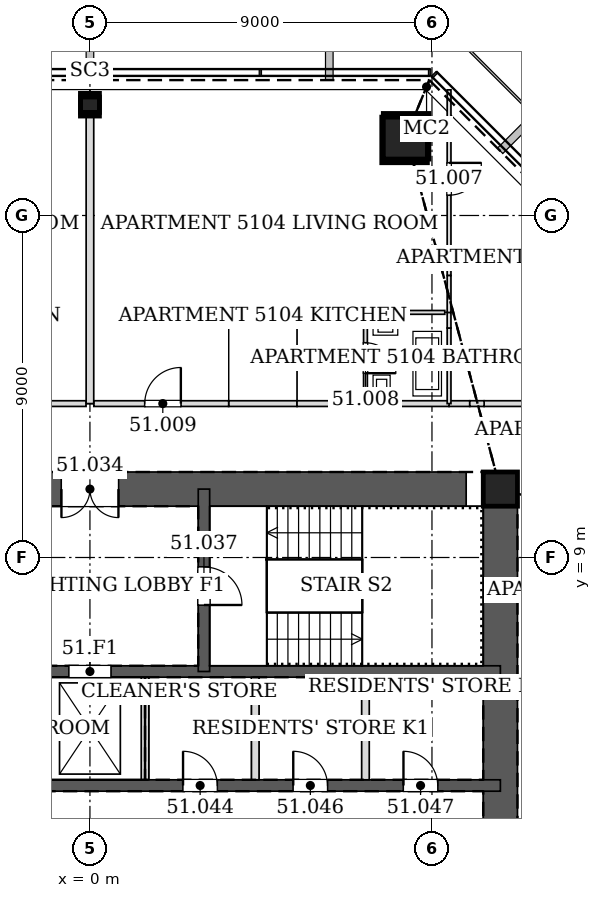
"""IFC4 building model, lengths in metres.
Left out: names, types, materials, properties, quantities, classifications, styles, units other than length and angle.
Written with IfcOpenShell. Run it as: python <this file> out.ifc"""

import sys

from ifc_helpers import new_model, si_unit, direction, frame, frame_2d, origin, origin_2d, place, context, subcontext, project, spatial, rectangle, hollow_rectangle, extrude, element, fill, save


model = new_model("IFC4")
c1 = context("Model", 3, precision=1e-05, world=origin(), true_north=direction((0.0, 1.0)))
c2 = subcontext(c1, "Body", "Model", "MODEL_VIEW")
j1 = project(units=[si_unit("LENGTHUNIT", "METRE"), si_unit("PLANEANGLEUNIT", "RADIAN")], contexts=[c1])
p1 = place(None, origin())
s1 = spatial("IfcSite", under=j1, at=p1, CompositionType="ELEMENT")
p2 = place(p1, origin())
s2 = spatial("IfcBuilding", under=s1, at=p2, CompositionType="ELEMENT")
p3 = place(p2, frame((0.0, 0.0, 221.0)))
s3 = spatial("IfcBuildingStorey", under=s2, at=p3, CompositionType="ELEMENT", Elevation=221.0)
p4 = place(p3, frame((8.319, 20.085, 0.0), z_axis=(-0.01169924247, -0.02827915051, 0.999531598986), x_axis=(0.924045401938, -0.382282742426, 0.0)))
e1 = element("IfcColumn", 1, at=p4, inside=s3, PredefinedType="COLUMN", context=c2, shape_type="SweptSolid", body=[
    extrude(hollow_rectangle(XDim=1.2, YDim=1.2, WallThickness=0.055, at=origin_2d()), origin(), (0.0, 0.0, 1.0), 3.402),
])
p5 = place(p3, frame((0.0, 20.963, 0.0), z_axis=(0.0, -0.028281086024, 0.999600010091), x_axis=(1.0, 0.0, 0.0)))
e2 = element("IfcColumn", 2, at=p5, inside=s3, PredefinedType="COLUMN", context=c2, shape_type="SweptSolid", body=[
    extrude(hollow_rectangle(XDim=0.5, YDim=0.5, WallThickness=0.025, at=origin_2d()), origin(), (0.0, 0.0, 1.0), 3.401),
])
p6 = place(p3, frame((10.8, 10.8, 0.0), z_axis=(0.0, 0.0, 1.0), x_axis=(1.0, 0.0, 0.0)))
e3 = element("IfcColumn", 3, at=p6, inside=s3, PredefinedType="COLUMN", context=c2, shape_type="SweptSolid", body=[
    extrude(hollow_rectangle(XDim=0.9, YDim=0.9, WallThickness=0.05, at=origin_2d()), origin(), (0.0, 0.0, 1.0), 3.4),
])
p7 = place(p3, frame((10.8, -10.8, 0.0), z_axis=(0.0, 0.0, 1.0), x_axis=(0.0, 1.0, 0.0)))
e4 = element("IfcWall", 4, at=p7, inside=s3, PredefinedType="SOLIDWALL", context=c2, shape_type="SweptSolid", body=[
    extrude(rectangle(XDim=21.6, YDim=0.9, at=frame_2d((10.8, 0.0))), origin(), (0.0, 0.0, 1.0), 3.4),
])
p8 = place(p7, frame((11.7, 0.0, 0.0)))
e5 = element("IfcOpeningElement", 5, at=p8, cuts=e4, PredefinedType="OPENING", context=c2, shape_type="SweptSolid", body=[
    extrude(rectangle(XDim=1.2, YDim=2.1, at=frame_2d((0.6, 1.05))), frame((0.0, 0.46, 0.0), z_axis=(0.0, -1.0, 0.0), x_axis=(1.0, 0.0, 0.0)), (0.0, 0.0, 1.0), 0.92),
])
p9 = place(p7, frame((8.7, 0.0, 0.0)))
e6 = element("IfcOpeningElement", 6, at=p9, cuts=e4, PredefinedType="OPENING", context=c2, shape_type="SweptSolid", body=[
    extrude(rectangle(XDim=1.2, YDim=2.1, at=frame_2d((0.6, 1.05))), frame((0.0, 0.46, 0.0), z_axis=(0.0, -1.0, 0.0), x_axis=(1.0, 0.0, 0.0)), (0.0, 0.0, 1.0), 0.92),
])
p10 = place(p3, frame((10.8, 10.8, 0.0), z_axis=(0.0, 0.0, 1.0), x_axis=(-1.0, 0.0, 0.0)))
e7 = element("IfcWall", 7, at=p10, inside=s3, PredefinedType="SOLIDWALL", context=c2, shape_type="SweptSolid", body=[
    extrude(rectangle(XDim=21.6, YDim=0.9, at=frame_2d((10.8, 0.0))), origin(), (0.0, 0.0, 1.0), 3.4),
])
p11 = place(p10, frame((10.05, 0.0, 0.0)))
e8 = element("IfcOpeningElement", 8, at=p11, cuts=e7, PredefinedType="OPENING", context=c2, shape_type="SweptSolid", body=[
    extrude(rectangle(XDim=1.5, YDim=2.1, at=frame_2d((0.75, 1.05))), frame((0.0, 0.46, 0.0), z_axis=(0.0, -1.0, 0.0), x_axis=(1.0, 0.0, 0.0)), (0.0, 0.0, 1.0), 0.92),
])
p12 = place(p3, frame((-10.8, 3.0, 0.0), z_axis=(0.0, 0.0, 1.0), x_axis=(1.0, 0.0, 0.0)))
e9 = element("IfcWall", 9, at=p12, inside=s3, PredefinedType="SOLIDWALL", context=c2, shape_type="SweptSolid", body=[
    extrude(rectangle(XDim=21.6, YDim=0.3, at=frame_2d((10.8, 0.0))), origin(), (0.0, 0.0, 1.0), 3.4),
])
p13 = place(p12, frame((1.65, 0.0, 0.0)))
e10 = element("IfcOpeningElement", 10, at=p13, cuts=e9, PredefinedType="OPENING", context=c2, shape_type="SweptSolid", body=[
    extrude(rectangle(XDim=0.9, YDim=2.1, at=frame_2d((0.45, 1.05))), frame((0.0, 0.16, 0.0), z_axis=(0.0, -1.0, 0.0), x_axis=(1.0, 0.0, 0.0)), (0.0, 0.0, 1.0), 0.32),
])
p14 = place(p12, frame((4.55, 0.0, 0.0)))
e11 = element("IfcOpeningElement", 11, at=p14, cuts=e9, PredefinedType="OPENING", context=c2, shape_type="SweptSolid", body=[
    extrude(rectangle(XDim=0.9, YDim=2.1, at=frame_2d((0.45, 1.05))), frame((0.0, 0.16, 0.0), z_axis=(0.0, -1.0, 0.0), x_axis=(1.0, 0.0, 0.0)), (0.0, 0.0, 1.0), 0.32),
])
p15 = place(p12, frame((7.45, 0.0, 0.0)))
e12 = element("IfcOpeningElement", 12, at=p15, cuts=e9, PredefinedType="OPENING", context=c2, shape_type="SweptSolid", body=[
    extrude(rectangle(XDim=0.9, YDim=2.1, at=frame_2d((0.45, 1.05))), frame((0.0, 0.16, 0.0), z_axis=(0.0, -1.0, 0.0), x_axis=(1.0, 0.0, 0.0)), (0.0, 0.0, 1.0), 0.32),
])
p16 = place(p12, frame((13.25, 0.0, 0.0)))
e13 = element("IfcOpeningElement", 13, at=p16, cuts=e9, PredefinedType="OPENING", context=c2, shape_type="SweptSolid", body=[
    extrude(rectangle(XDim=0.9, YDim=2.1, at=frame_2d((0.45, 1.05))), frame((0.0, 0.16, 0.0), z_axis=(0.0, -1.0, 0.0), x_axis=(1.0, 0.0, 0.0)), (0.0, 0.0, 1.0), 0.32),
])
p17 = place(p12, frame((16.15, 0.0, 0.0)))
e14 = element("IfcOpeningElement", 14, at=p17, cuts=e9, PredefinedType="OPENING", context=c2, shape_type="SweptSolid", body=[
    extrude(rectangle(XDim=0.9, YDim=2.1, at=frame_2d((0.45, 1.05))), frame((0.0, 0.16, 0.0), z_axis=(0.0, -1.0, 0.0), x_axis=(1.0, 0.0, 0.0)), (0.0, 0.0, 1.0), 0.32),
])
p18 = place(p12, frame((19.05, 0.0, 0.0)))
e15 = element("IfcOpeningElement", 15, at=p18, cuts=e9, PredefinedType="OPENING", context=c2, shape_type="SweptSolid", body=[
    extrude(rectangle(XDim=0.9, YDim=2.1, at=frame_2d((0.45, 1.05))), frame((0.0, 0.16, 0.0), z_axis=(0.0, -1.0, 0.0), x_axis=(1.0, 0.0, 0.0)), (0.0, 0.0, 1.0), 0.32),
])
p19 = place(p3, frame((-10.8, 6.0, 0.0), z_axis=(0.0, 0.0, 1.0), x_axis=(1.0, 0.0, 0.0)))
e16 = element("IfcWall", 16, at=p19, inside=s3, PredefinedType="SOLIDWALL", context=c2, shape_type="SweptSolid", body=[
    extrude(rectangle(XDim=21.6, YDim=0.3, at=frame_2d((10.8, 0.0))), origin(), (0.0, 0.0, 1.0), 3.4),
])
p20 = place(p19, frame((10.25, 0.0, 0.0)))
e17 = element("IfcOpeningElement", 17, at=p20, cuts=e16, PredefinedType="OPENING", context=c2, shape_type="SweptSolid", body=[
    extrude(rectangle(XDim=1.1, YDim=2.1, at=frame_2d((0.55, 1.05))), frame((0.0, 0.16, 0.0), z_axis=(0.0, -1.0, 0.0), x_axis=(1.0, 0.0, 0.0)), (0.0, 0.0, 1.0), 0.32),
])
p21 = place(p3, frame((3.0, 6.0, 0.0), z_axis=(0.0, 0.0, 1.0), x_axis=(0.0, 1.0, 0.0)))
e18 = element("IfcWall", 18, at=p21, inside=s3, PredefinedType="SOLIDWALL", context=c2, shape_type="SweptSolid", body=[
    extrude(rectangle(XDim=4.8, YDim=0.3, at=frame_2d((2.4, 0.0))), origin(), (0.0, 0.0, 1.0), 3.4),
])
p22 = place(p21, frame((1.75, 0.0, 0.0)))
e19 = element("IfcOpeningElement", 19, at=p22, cuts=e18, PredefinedType="OPENING", context=c2, shape_type="SweptSolid", body=[
    extrude(rectangle(XDim=1.0, YDim=2.1, at=frame_2d((0.5, 1.05))), frame((0.0, 0.16, 0.0), z_axis=(0.0, -1.0, 0.0), x_axis=(1.0, 0.0, 0.0)), (0.0, 0.0, 1.0), 0.32),
])
p23 = place(p3, frame((13.05, 13.05, 0.0), z_axis=(0.0, 0.0, 1.0), x_axis=(-1.0, 0.0, 0.0)))
e20 = element("IfcWall", 20, at=p23, inside=s3, PredefinedType="PARTITIONING", context=c2, shape_type="SweptSolid", body=[
    extrude(rectangle(XDim=2.677, YDim=0.15, at=frame_2d((1.339, 0.0))), origin(), (0.0, 0.0, 1.0), 2.578),
])
p24 = place(p3, frame((9.995, 13.05, 0.0), z_axis=(0.0, 0.0, 1.0), x_axis=(-1.0, 0.0, 0.0)))
e21 = element("IfcWall", 21, at=p24, inside=s3, PredefinedType="PARTITIONING", context=c2, shape_type="SweptSolid", body=[
    extrude(rectangle(XDim=0.546, YDim=0.15, at=frame_2d((0.273, 0.0))), origin(), (0.0, 0.0, 1.0), 3.2),
])
p25 = place(p3, frame((10.373, 13.05, 0.0), z_axis=(0.0, 0.0, 1.0), x_axis=(-1.0, 0.0, 0.0)))
e22 = element("IfcWall", 22, at=p25, inside=s3, PredefinedType="PARTITIONING", context=c2, shape_type="SweptSolid", body=[
    extrude(rectangle(XDim=0.378, YDim=0.15, at=frame_2d((0.189, 0.0))), origin(), (0.0, 0.0, 1.0), 2.268),
])
p26 = place(p3, frame((9.451, 13.05, 0.0), z_axis=(0.0, 0.0, 1.0), x_axis=(-1.0, 0.0, 0.0)))
e23 = element("IfcWall", 23, at=p26, inside=s3, PredefinedType="PARTITIONING", context=c2, shape_type="SweptSolid", body=[
    extrude(rectangle(XDim=2.202, YDim=0.15, at=frame_2d((1.101, 0.0))), origin(), (0.0, 0.0, 1.0), 3.2),
])
p27 = place(p3, frame((5.451, 13.05, 0.0), z_axis=(0.0, 0.0, 1.0), x_axis=(-1.0, 0.0, 0.0)))
e24 = element("IfcWall", 24, at=p27, inside=s3, PredefinedType="PARTITIONING", context=c2, shape_type="SweptSolid", body=[
    extrude(rectangle(XDim=1.802, YDim=0.15, at=frame_2d((0.901, 0.0))), origin(), (0.0, 0.0, 1.0), 3.2),
])
p28 = place(p3, frame((3.651, 13.05, 0.0), z_axis=(0.0, 0.0, 1.0), x_axis=(-1.0, 0.0, 0.0)))
e25 = element("IfcWall", 25, at=p28, inside=s3, PredefinedType="PARTITIONING", context=c2, shape_type="SweptSolid", body=[
    extrude(rectangle(XDim=3.549, YDim=0.15, at=frame_2d((1.774, 0.0))), origin(), (0.0, 0.0, 1.0), 3.2),
])
p29 = place(p28, frame((1.259, 0.0, 0.0)))
e26 = element("IfcOpeningElement", 26, at=p29, cuts=e25, PredefinedType="OPENING", context=c2, shape_type="SweptSolid", body=[
    extrude(rectangle(XDim=0.95, YDim=2.1, at=frame_2d((0.475, 1.05))), frame((0.0, 0.085, 0.0), z_axis=(0.0, -1.0, 0.0), x_axis=(1.0, 0.0, 0.0)), (0.0, 0.0, 1.0), 0.17),
])
p30 = place(p3, frame((7.251, 13.05, 0.0), z_axis=(0.0, 0.0, 1.0), x_axis=(-1.0, 0.0, 0.0)))
e27 = element("IfcWall", 27, at=p30, inside=s3, PredefinedType="PARTITIONING", context=c2, shape_type="SweptSolid", body=[
    extrude(rectangle(XDim=1.802, YDim=0.15, at=frame_2d((0.901, 0.0))), origin(), (0.0, 0.0, 1.0), 3.2),
])
p31 = place(p3, frame((-0.102, 13.05, 0.0), z_axis=(0.0, 0.0, 1.0), x_axis=(-1.0, 0.0, 0.0)))
e28 = element("IfcWall", 28, at=p31, inside=s3, PredefinedType="PARTITIONING", context=c2, shape_type="SweptSolid", body=[
    extrude(rectangle(XDim=3.549, YDim=0.15, at=frame_2d((1.774, 0.0))), origin(), (0.0, 0.0, 1.0), 3.2),
])
p32 = place(p31, frame((1.34, 0.0, 0.0)))
e29 = element("IfcOpeningElement", 29, at=p32, cuts=e28, PredefinedType="OPENING", context=c2, shape_type="SweptSolid", body=[
    extrude(rectangle(XDim=0.95, YDim=2.1, at=frame_2d((0.475, 1.05))), frame((0.0, 0.085, 0.0), z_axis=(0.0, -1.0, 0.0), x_axis=(1.0, 0.0, 0.0)), (0.0, 0.0, 1.0), 0.17),
])
p33 = place(p3, frame((9.45, 15.039, 0.0), z_axis=(0.0, 0.0, 1.0), x_axis=(0.0, -1.0, 0.0)))
e30 = element("IfcWall", 30, at=p33, inside=s3, PredefinedType="PARTITIONING", context=c2, shape_type="SweptSolid", body=[
    extrude(rectangle(XDim=1.989, YDim=0.1, at=frame_2d((0.994, 0.0))), origin(), (0.0, 0.0, 1.0), 2.591),
])
p34 = place(p3, frame((9.45, 15.451, 0.0), z_axis=(0.0, 0.0, 1.0), x_axis=(0.0, -1.0, 0.0)))
e31 = element("IfcWall", 31, at=p34, inside=s3, PredefinedType="PARTITIONING", context=c2, shape_type="SweptSolid", body=[
    extrude(rectangle(XDim=0.412, YDim=0.1, at=frame_2d((0.206, 0.0))), origin(), (0.0, 0.0, 1.0), 2.268),
])
p35 = place(p3, frame((9.45, 21.306, 0.0), z_axis=(0.0, 0.0, 1.0), x_axis=(0.0, -1.0, 0.0)))
e32 = element("IfcWall", 32, at=p35, inside=s3, PredefinedType="PARTITIONING", context=c2, shape_type="SweptSolid", body=[
    extrude(rectangle(XDim=4.886, YDim=0.1, at=frame_2d((2.443, 0.0))), origin(), (0.0, 0.0, 1.0), 2.784),
])
p36 = place(p35, frame((1.921, 0.0, 0.0)))
e33 = element("IfcOpeningElement", 33, at=p36, cuts=e32, PredefinedType="OPENING", context=c2, shape_type="SweptSolid", body=[
    extrude(rectangle(XDim=0.85, YDim=2.1, at=frame_2d((0.425, 1.05))), frame((0.0, 0.06, 0.0), z_axis=(0.0, -1.0, 0.0), x_axis=(1.0, 0.0, 0.0)), (0.0, 0.0, 1.0), 0.12),
])
p37 = place(p3, frame((9.45, 16.42, 0.0), z_axis=(0.0, 0.0, 1.0), x_axis=(0.0, -1.0, 0.0)))
e34 = element("IfcWall", 34, at=p37, inside=s3, PredefinedType="PARTITIONING", context=c2, shape_type="SweptSolid", body=[
    extrude(rectangle(XDim=0.971, YDim=0.1, at=frame_2d((0.485, 0.0))), origin(), (0.0, 0.0, 1.0), 2.268),
])
p38 = place(p3, frame((9.337, 15.45, 0.0), z_axis=(0.0, 0.0, 1.0), x_axis=(-1.0, 0.0, 0.0)))
e35 = element("IfcWall", 35, at=p38, inside=s3, PredefinedType="PARTITIONING", context=c2, shape_type="SweptSolid", body=[
    extrude(rectangle(XDim=2.087, YDim=0.1, at=frame_2d((1.044, 0.0))), origin(), (0.0, 0.0, 1.0), 3.2),
])
p39 = place(p3, frame((7.25, 15.45, 0.0), z_axis=(0.0, 0.0, 1.0), x_axis=(0.0, -1.0, 0.0)))
e36 = element("IfcWall", 36, at=p39, inside=s3, PredefinedType="PARTITIONING", context=c2, shape_type="SweptSolid", body=[
    extrude(rectangle(XDim=2.4, YDim=0.1, at=frame_2d((1.2, 0.0))), origin(), (0.0, 0.0, 1.0), 2.591),
])
p40 = place(p39, frame((0.8, 0.0, 0.0)))
e37 = element("IfcOpeningElement", 37, at=p40, cuts=e36, PredefinedType="OPENING", context=c2, shape_type="SweptSolid", body=[
    extrude(rectangle(XDim=0.8, YDim=2.1, at=frame_2d((0.4, 1.05))), frame((0.0, 0.06, 0.0), z_axis=(0.0, -1.0, 0.0), x_axis=(1.0, 0.0, 0.0)), (0.0, 0.0, 1.0), 0.12),
])
p41 = place(p3, frame((0.0, 20.598, 0.0), z_axis=(0.0, 0.0, 1.0), x_axis=(0.0, -1.0, 0.0)))
e38 = element("IfcWall", 38, at=p41, inside=s3, PredefinedType="PARTITIONING", context=c2, shape_type="SweptSolid", body=[
    extrude(rectangle(XDim=7.548, YDim=0.2, at=frame_2d((3.774, 0.0))), origin(), (0.0, 0.0, 1.0), 2.253),
])
for number, where, z_axis, x_axis in (
    (39, (1.45, 3.15, 0.0), (0.0, 0.0, 1.0), (0.0, 1.0, 0.0)),
    (40, (4.35, 3.15, 0.0), (0.0, 0.0, 1.0), (0.0, 1.0, 0.0)),
    (41, (7.25, 3.15, 0.0), (0.0, 0.0, 1.0), (0.0, 1.0, 0.0)),
):
    element("IfcWall", number, at=place(p3, frame(where, z_axis=z_axis, x_axis=x_axis)), inside=s3, PredefinedType="PARTITIONING", context=c2, shape_type="SweptSolid", body=[
        extrude(rectangle(XDim=2.7, YDim=0.2, at=frame_2d((1.35, 0.0))), origin(), (0.0, 0.0, 1.0), 3.2),
    ])
p42 = place(p36, origin())
e42 = element("IfcDoor", 42, at=p42, inside=s3, OperationType="SINGLE_SWING_LEFT", PredefinedType="DOOR", context=c2, shape_type="SweptSolid", body=[
    extrude(rectangle(XDim=0.85, YDim=2.1, at=frame_2d((0.425, 1.05))), frame((0.0, 0.025, 0.0), z_axis=(0.0, -1.0, 0.0), x_axis=(1.0, 0.0, 0.0)), (0.0, 0.0, 1.0), 0.05),
])
fill(e33, e42)
p43 = place(p40, origin())
e43 = element("IfcDoor", 43, at=p43, inside=s3, OperationType="SINGLE_SWING_RIGHT", PredefinedType="DOOR", context=c2, shape_type="SweptSolid", body=[
    extrude(rectangle(XDim=0.8, YDim=2.1, at=frame_2d((0.4, 1.05))), frame((0.0, 0.025, 0.0), z_axis=(0.0, -1.0, 0.0), x_axis=(1.0, 0.0, 0.0)), (0.0, 0.0, 1.0), 0.05),
])
fill(e37, e43)
p44 = place(p29, frame((0.95, 0.0, 0.0), z_axis=(0.0, 0.0, 1.0), x_axis=(-1.0, 0.0, 0.0)))
e44 = element("IfcDoor", 44, at=p44, inside=s3, OperationType="SINGLE_SWING_RIGHT", PredefinedType="DOOR", context=c2, shape_type="SweptSolid", body=[
    extrude(rectangle(XDim=0.95, YDim=2.1, at=frame_2d((0.475, 1.05))), frame((0.0, 0.025, 0.0), z_axis=(0.0, -1.0, 0.0), x_axis=(1.0, 0.0, 0.0)), (0.0, 0.0, 1.0), 0.05),
])
fill(e26, e44)
p45 = place(p11, origin())
e45 = element("IfcDoor", 45, at=p45, inside=s3, OperationType="DOUBLE_DOOR_SINGLE_SWING", PredefinedType="DOOR", context=c2, shape_type="SweptSolid", body=[
    extrude(rectangle(XDim=1.5, YDim=2.1, at=frame_2d((0.75, 1.05))), frame((0.0, 0.025, 0.0), z_axis=(0.0, -1.0, 0.0), x_axis=(1.0, 0.0, 0.0)), (0.0, 0.0, 1.0), 0.05),
])
fill(e8, e45)
p46 = place(p22, frame((1.0, 0.0, 0.0), z_axis=(0.0, 0.0, 1.0), x_axis=(-1.0, 0.0, 0.0)))
e46 = element("IfcDoor", 46, at=p46, inside=s3, OperationType="SINGLE_SWING_RIGHT", PredefinedType="DOOR", context=c2, shape_type="SweptSolid", body=[
    extrude(rectangle(XDim=1.0, YDim=2.1, at=frame_2d((0.5, 1.05))), frame((0.0, 0.025, 0.0), z_axis=(0.0, -1.0, 0.0), x_axis=(1.0, 0.0, 0.0)), (0.0, 0.0, 1.0), 0.05),
])
fill(e19, e46)
p47 = place(p16, origin())
e47 = element("IfcDoor", 47, at=p47, inside=s3, OperationType="SINGLE_SWING_LEFT", PredefinedType="DOOR", context=c2, shape_type="SweptSolid", body=[
    extrude(rectangle(XDim=0.9, YDim=2.1, at=frame_2d((0.45, 1.05))), frame((0.0, 0.025, 0.0), z_axis=(0.0, -1.0, 0.0), x_axis=(1.0, 0.0, 0.0)), (0.0, 0.0, 1.0), 0.05),
])
fill(e13, e47)
p48 = place(p17, origin())
e48 = element("IfcDoor", 48, at=p48, inside=s3, OperationType="SINGLE_SWING_LEFT", PredefinedType="DOOR", context=c2, shape_type="SweptSolid", body=[
    extrude(rectangle(XDim=0.9, YDim=2.1, at=frame_2d((0.45, 1.05))), frame((0.0, 0.025, 0.0), z_axis=(0.0, -1.0, 0.0), x_axis=(1.0, 0.0, 0.0)), (0.0, 0.0, 1.0), 0.05),
])
fill(e14, e48)
p49 = place(p18, origin())
e49 = element("IfcDoor", 49, at=p49, inside=s3, OperationType="SINGLE_SWING_LEFT", PredefinedType="DOOR", context=c2, shape_type="SweptSolid", body=[
    extrude(rectangle(XDim=0.9, YDim=2.1, at=frame_2d((0.45, 1.05))), frame((0.0, 0.025, 0.0), z_axis=(0.0, -1.0, 0.0), x_axis=(1.0, 0.0, 0.0)), (0.0, 0.0, 1.0), 0.05),
])
fill(e15, e49)
p50 = place(p20, origin())
e50 = element("IfcDoor", 50, at=p50, inside=s3, OperationType="DOUBLE_DOOR_SLIDING", PredefinedType="DOOR", context=c2, shape_type="SweptSolid", body=[
    extrude(rectangle(XDim=1.1, YDim=2.1, at=frame_2d((0.55, 1.05))), frame((0.0, 0.025, 0.0), z_axis=(0.0, -1.0, 0.0), x_axis=(1.0, 0.0, 0.0)), (0.0, 0.0, 1.0), 0.05),
])
fill(e17, e50)
save(model, sys.argv[1])
